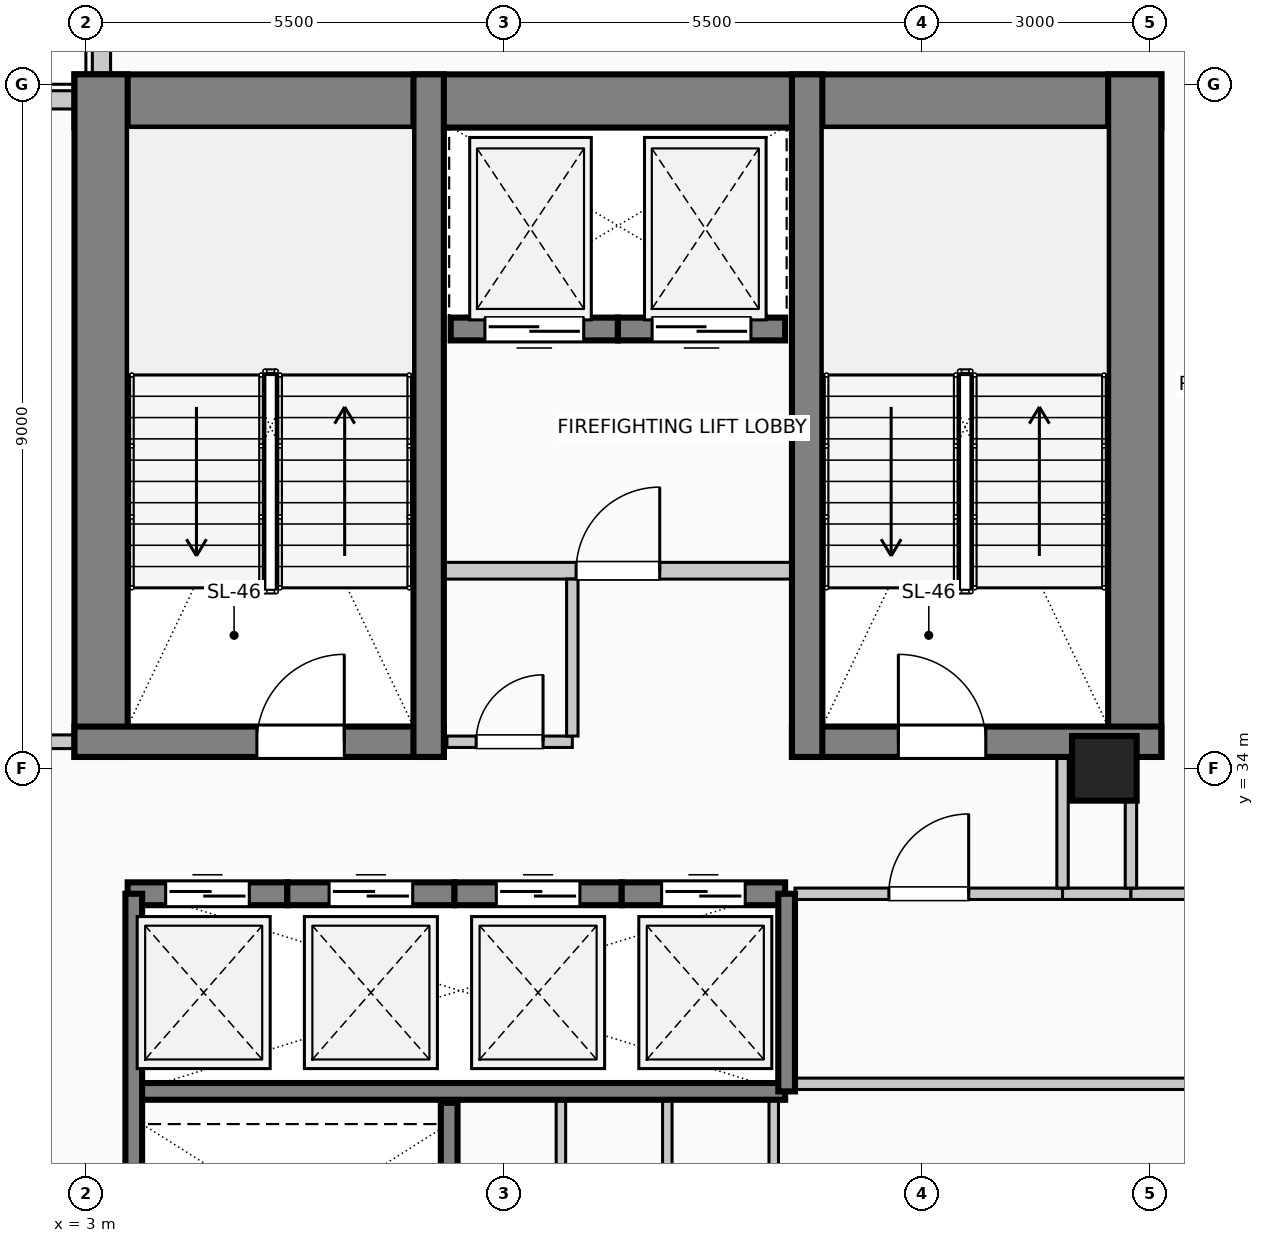
"""IFC4 building model, lengths in metres.
Left out: names, types, materials, properties, quantities, classifications, styles, units other than length and angle.
Written with IfcOpenShell. Run it as: python <this file> out.ifc"""

import sys

from ifc_helpers import new_model, si_unit, direction, frame, frame_2d, origin, origin_2d, place, context, subcontext, project, spatial, rectangle, circle, extrude, element, fill, save


model = new_model("IFC4")
c1 = context("Model", 3, precision=1e-05, world=origin(), true_north=direction((0.0, 1.0)))
c2 = subcontext(c1, "Body", "Model", "MODEL_VIEW")
j1 = project(units=[si_unit("LENGTHUNIT", "METRE"), si_unit("PLANEANGLEUNIT", "RADIAN")], contexts=[c1])
p1 = place(None, origin())
s1 = spatial("IfcSite", under=j1, at=p1, CompositionType="ELEMENT")
p2 = place(p1, origin())
s2 = spatial("IfcBuilding", under=s1, at=p2, CompositionType="ELEMENT")
p3 = place(p2, frame((0.0, 0.0, 252.6)))
s3 = spatial("IfcBuildingStorey", under=s2, at=p3, CompositionType="ELEMENT", Elevation=252.6)
p4 = place(p3, frame((2.85, 42.78, 0.0), z_axis=(0.0, 0.0, 1.0), x_axis=(1.0, 0.0, 0.0)))
e1 = element("IfcWall", 1, at=p4, inside=s3, PredefinedType="SHEAR", context=c2, shape_type="SweptSolid", body=[
    extrude(rectangle(XDim=14.3, YDim=0.7, at=frame_2d((7.15, 0.0))), origin(), (0.0, 0.0, 1.0), 4.0),
])
for number, where, z_axis, x_axis in (
    (2, (3.2, 34.15, 0.0), (0.0, 0.0, 1.0), (0.0, 1.0, 0.0)),
    (3, (16.8, 34.15, 0.0), (0.0, 0.0, 1.0), (0.0, 1.0, 0.0)),
):
    element("IfcWall", number, at=place(p3, frame(where, z_axis=z_axis, x_axis=x_axis)), inside=s3, PredefinedType="SHEAR", context=c2, shape_type="SweptSolid", body=[
        extrude(rectangle(XDim=8.98, YDim=0.7, at=frame_2d((4.49, 0.0))), origin(), (0.0, 0.0, 1.0), 4.0),
    ])
p5 = place(p3, frame((2.85, 34.35, 0.0), z_axis=(0.0, 0.0, 1.0), x_axis=(1.0, 0.0, 0.0)))
e4 = element("IfcWall", 4, at=p5, inside=s3, PredefinedType="SHEAR", context=c2, shape_type="SweptSolid", body=[
    extrude(rectangle(XDim=4.86, YDim=0.4, at=frame_2d((2.43, 0.0))), origin(), (0.0, 0.0, 1.0), 4.0),
])
p6 = place(p5, frame((2.4, 0.0, 0.0)))
e5 = element("IfcOpeningElement", 5, at=p6, cuts=e4, PredefinedType="OPENING", context=c2, shape_type="SweptSolid", body=[
    extrude(rectangle(XDim=1.15, YDim=2.2, at=frame_2d((0.575, 1.1))), frame((0.0, 0.21, 0.0), z_axis=(0.0, -1.0, 0.0), x_axis=(1.0, 0.0, 0.0)), (0.0, 0.0, 1.0), 0.42),
])
p7 = place(p3, frame((12.29, 34.35, 0.0), z_axis=(0.0, 0.0, 1.0), x_axis=(1.0, 0.0, 0.0)))
e6 = element("IfcWall", 6, at=p7, inside=s3, PredefinedType="SHEAR", context=c2, shape_type="SweptSolid", body=[
    extrude(rectangle(XDim=4.86, YDim=0.4, at=frame_2d((2.43, 0.0))), origin(), (0.0, 0.0, 1.0), 4.0),
])
p8 = place(p7, frame((1.4, 0.0, 0.0)))
e7 = element("IfcOpeningElement", 7, at=p8, cuts=e6, PredefinedType="OPENING", context=c2, shape_type="SweptSolid", body=[
    extrude(rectangle(XDim=1.15, YDim=2.2, at=frame_2d((0.575, 1.1))), frame((0.0, 0.21, 0.0), z_axis=(0.0, -1.0, 0.0), x_axis=(1.0, 0.0, 0.0)), (0.0, 0.0, 1.0), 0.42),
])
for number, where, z_axis, x_axis in (
    (8, (7.51, 34.15, 0.0), (0.0, 0.0, 1.0), (0.0, 1.0, 0.0)),
    (9, (12.49, 34.15, 0.0), (0.0, 0.0, 1.0), (0.0, 1.0, 0.0)),
):
    element("IfcWall", number, at=place(p3, frame(where, z_axis=z_axis, x_axis=x_axis)), inside=s3, PredefinedType="SHEAR", context=c2, shape_type="SweptSolid", body=[
        extrude(rectangle(XDim=8.98, YDim=0.4, at=frame_2d((4.49, 0.0))), origin(), (0.0, 0.0, 1.0), 4.0),
    ])
p9 = place(p3, frame((16.4, 34.0, 0.0), z_axis=(0.0, 0.0, 1.0), x_axis=(1.0, 0.0, 0.0)))
e10 = element("IfcColumn", 10, at=p9, inside=s3, PredefinedType="COLUMN", context=c2, shape_type="SweptSolid", body=[
    extrude(circle(Radius=0.425, at=origin_2d()), origin(), (0.0, 0.0, 1.0), 4.0),
])
p10 = place(p3, frame((0.6, 42.795, 0.0), z_axis=(0.0, 0.0, 1.0), x_axis=(1.0, 0.0, 0.0)))
e11 = element("IfcWall", 11, at=p10, inside=s3, PredefinedType="SOLIDWALL", context=c2, shape_type="SweptSolid", body=[
    extrude(rectangle(XDim=2.245, YDim=0.24, at=frame_2d((1.123, 0.0))), origin(), (0.0, 0.0, 1.0), 3.75),
])
p11 = place(p3, frame((3.205, 43.135, 0.0), z_axis=(0.0, 0.0, 1.0), x_axis=(0.0, 1.0, 0.0)))
e12 = element("IfcWall", 12, at=p11, inside=s3, PredefinedType="SOLIDWALL", context=c2, shape_type="SweptSolid", body=[
    extrude(rectangle(XDim=2.265, YDim=0.24, at=frame_2d((1.132, 0.0))), origin(), (0.0, 0.0, 1.0), 3.75),
])
p12 = place(p3, frame((3.55, 32.35, 0.0), z_axis=(0.0, 0.0, 1.0), x_axis=(1.0, 0.0, 0.0)))
e13 = element("IfcWall", 13, at=p12, inside=s3, PredefinedType="SOLIDWALL", context=c2, shape_type="SweptSolid", body=[
    extrude(rectangle(XDim=2.1, YDim=0.3, at=frame_2d((1.05, 0.0))), origin(), (0.0, 0.0, 1.0), 4.0),
])
p13 = place(p12, frame((0.5, 0.0, 0.0)))
e14 = element("IfcOpeningElement", 14, at=p13, cuts=e13, PredefinedType="OPENING", context=c2, shape_type="SweptSolid", body=[
    extrude(rectangle(XDim=1.1, YDim=2.2, at=frame_2d((0.55, 1.1))), frame((0.0, 0.16, 0.0), z_axis=(0.0, -1.0, 0.0), x_axis=(1.0, 0.0, 0.0)), (0.0, 0.0, 1.0), 0.32),
])
p14 = place(p3, frame((5.65, 32.35, 0.0), z_axis=(0.0, 0.0, 1.0), x_axis=(1.0, 0.0, 0.0)))
e15 = element("IfcWall", 15, at=p14, inside=s3, PredefinedType="SOLIDWALL", context=c2, shape_type="SweptSolid", body=[
    extrude(rectangle(XDim=2.2, YDim=0.3, at=frame_2d((1.1, 0.0))), origin(), (0.0, 0.0, 1.0), 4.0),
])
p15 = place(p14, frame((0.55, 0.0, 0.0)))
e16 = element("IfcOpeningElement", 16, at=p15, cuts=e15, PredefinedType="OPENING", context=c2, shape_type="SweptSolid", body=[
    extrude(rectangle(XDim=1.1, YDim=2.2, at=frame_2d((0.55, 1.1))), frame((0.0, 0.16, 0.0), z_axis=(0.0, -1.0, 0.0), x_axis=(1.0, 0.0, 0.0)), (0.0, 0.0, 1.0), 0.32),
])
p16 = place(p3, frame((7.85, 32.35, 0.0), z_axis=(0.0, 0.0, 1.0), x_axis=(1.0, 0.0, 0.0)))
e17 = element("IfcWall", 17, at=p16, inside=s3, PredefinedType="SOLIDWALL", context=c2, shape_type="SweptSolid", body=[
    extrude(rectangle(XDim=2.2, YDim=0.3, at=frame_2d((1.1, 0.0))), origin(), (0.0, 0.0, 1.0), 4.0),
])
p17 = place(p16, frame((0.55, 0.0, 0.0)))
e18 = element("IfcOpeningElement", 18, at=p17, cuts=e17, PredefinedType="OPENING", context=c2, shape_type="SweptSolid", body=[
    extrude(rectangle(XDim=1.1, YDim=2.2, at=frame_2d((0.55, 1.1))), frame((0.0, 0.16, 0.0), z_axis=(0.0, -1.0, 0.0), x_axis=(1.0, 0.0, 0.0)), (0.0, 0.0, 1.0), 0.32),
])
p18 = place(p3, frame((10.05, 32.35, 0.0), z_axis=(0.0, 0.0, 1.0), x_axis=(1.0, 0.0, 0.0)))
e19 = element("IfcWall", 19, at=p18, inside=s3, PredefinedType="SOLIDWALL", context=c2, shape_type="SweptSolid", body=[
    extrude(rectangle(XDim=2.15, YDim=0.3, at=frame_2d((1.075, 0.0))), origin(), (0.0, 0.0, 1.0), 4.0),
])
p19 = place(p18, frame((0.525, 0.0, 0.0)))
e20 = element("IfcOpeningElement", 20, at=p19, cuts=e19, PredefinedType="OPENING", context=c2, shape_type="SweptSolid", body=[
    extrude(rectangle(XDim=1.1, YDim=2.2, at=frame_2d((0.55, 1.1))), frame((0.0, 0.16, 0.0), z_axis=(0.0, -1.0, 0.0), x_axis=(1.0, 0.0, 0.0)), (0.0, 0.0, 1.0), 0.32),
])
p20 = place(p3, frame((10.0, 39.78, 0.0), z_axis=(0.0, 0.0, 1.0), x_axis=(-1.0, 0.0, 0.0)))
e21 = element("IfcWall", 21, at=p20, inside=s3, PredefinedType="SOLIDWALL", context=c2, shape_type="SweptSolid", body=[
    extrude(rectangle(XDim=2.2, YDim=0.3, at=frame_2d((1.1, 0.0))), origin(), (0.0, 0.0, 1.0), 4.0),
])
p21 = place(p20, frame((0.45, 0.0, 0.0)))
e22 = element("IfcOpeningElement", 22, at=p21, cuts=e21, PredefinedType="OPENING", context=c2, shape_type="SweptSolid", body=[
    extrude(rectangle(XDim=1.3, YDim=2.25, at=frame_2d((0.65, 1.125))), frame((0.0, 0.16, 0.0), z_axis=(0.0, -1.0, 0.0), x_axis=(1.0, 0.0, 0.0)), (0.0, 0.0, 1.0), 0.32),
])
p22 = place(p3, frame((12.2, 39.78, 0.0), z_axis=(0.0, 0.0, 1.0), x_axis=(-1.0, 0.0, 0.0)))
e23 = element("IfcWall", 23, at=p22, inside=s3, PredefinedType="SOLIDWALL", context=c2, shape_type="SweptSolid", body=[
    extrude(rectangle(XDim=2.2, YDim=0.3, at=frame_2d((1.1, 0.0))), origin(), (0.0, 0.0, 1.0), 4.0),
])
p23 = place(p22, frame((0.45, 0.0, 0.0)))
e24 = element("IfcOpeningElement", 24, at=p23, cuts=e23, PredefinedType="OPENING", context=c2, shape_type="SweptSolid", body=[
    extrude(rectangle(XDim=1.3, YDim=2.25, at=frame_2d((0.65, 1.125))), frame((0.0, 0.16, 0.0), z_axis=(0.0, -1.0, 0.0), x_axis=(1.0, 0.0, 0.0)), (0.0, 0.0, 1.0), 0.32),
])
p24 = place(p3, frame((3.55, 29.75, 0.0), z_axis=(0.0, 0.0, 1.0), x_axis=(1.0, 0.0, 0.0)))
e25 = element("IfcWall", 25, at=p24, inside=s3, PredefinedType="SOLIDWALL", context=c2, shape_type="SweptSolid", body=[
    extrude(rectangle(XDim=8.65, YDim=0.22, at=frame_2d((4.325, 0.0))), origin(), (0.0, 0.0, 1.0), 4.0),
])
p25 = place(p3, frame((3.63, 26.8, 0.0), z_axis=(0.0, 0.0, 1.0), x_axis=(0.0, 1.0, 0.0)))
e26 = element("IfcWall", 26, at=p25, inside=s3, PredefinedType="SOLIDWALL", context=c2, shape_type="SweptSolid", body=[
    extrude(rectangle(XDim=5.55, YDim=0.22, at=frame_2d((2.775, 0.0))), origin(), (0.0, 0.0, 1.0), 4.0),
])
p26 = place(p3, frame((7.78, 26.8, 0.0), z_axis=(0.0, 0.0, 1.0), x_axis=(0.0, 1.0, 0.0)))
e27 = element("IfcWall", 27, at=p26, inside=s3, PredefinedType="SOLIDWALL", context=c2, shape_type="SweptSolid", body=[
    extrude(rectangle(XDim=2.8, YDim=0.22, at=frame_2d((1.4, 0.0))), origin(), (0.0, 0.0, 1.0), 4.0),
])
p27 = place(p3, frame((12.22, 29.75, 0.0), z_axis=(0.0, 0.0, 1.0), x_axis=(0.0, 1.0, 0.0)))
e28 = element("IfcWall", 28, at=p27, inside=s3, PredefinedType="SOLIDWALL", context=c2, shape_type="SweptSolid", body=[
    extrude(rectangle(XDim=2.6, YDim=0.22, at=frame_2d((1.3, 0.0))), origin(), (0.0, 0.0, 1.0), 4.0),
])
p28 = place(p3, frame((7.51, 36.6, 0.0), z_axis=(0.0, 0.0, 1.0), x_axis=(1.0, 0.0, 0.0)))
e29 = element("IfcWall", 29, at=p28, inside=s3, PredefinedType="PARTITIONING", context=c2, shape_type="SweptSolid", body=[
    extrude(rectangle(XDim=4.98, YDim=0.22, at=frame_2d((2.49, 0.0))), origin(), (0.0, 0.0, 1.0), 3.75),
])
p29 = place(p28, frame((1.94, 0.0, 0.0)))
e30 = element("IfcOpeningElement", 30, at=p29, cuts=e29, PredefinedType="OPENING", context=c2, shape_type="SweptSolid", body=[
    extrude(rectangle(XDim=1.1, YDim=2.2, at=frame_2d((0.55, 1.1))), frame((0.0, 0.12, 0.0), z_axis=(0.0, -1.0, 0.0), x_axis=(1.0, 0.0, 0.0)), (0.0, 0.0, 1.0), 0.24),
])
p30 = place(p3, frame((12.33, 29.85, 0.0), z_axis=(0.0, 0.0, 1.0), x_axis=(1.0, 0.0, 0.0)))
e31 = element("IfcWall", 31, at=p30, inside=s3, PredefinedType="PARTITIONING", context=c2, shape_type="SweptSolid", body=[
    extrude(rectangle(XDim=8.67, YDim=0.15, at=frame_2d((4.335, 0.0))), origin(), (0.0, 0.0, 1.0), 3.75),
])
p31 = place(p3, frame((12.33, 32.35, 0.0), z_axis=(0.0, 0.0, 1.0), x_axis=(1.0, 0.0, 0.0)))
e32 = element("IfcWall", 32, at=p31, inside=s3, PredefinedType="PARTITIONING", context=c2, shape_type="SweptSolid", body=[
    extrude(rectangle(XDim=3.52, YDim=0.15, at=frame_2d((1.76, 0.0))), origin(), (0.0, 0.0, 1.0), 3.75),
])
p32 = place(p31, frame((1.235, 0.0, 0.0)))
e33 = element("IfcOpeningElement", 33, at=p32, cuts=e32, PredefinedType="OPENING", context=c2, shape_type="SweptSolid", body=[
    extrude(rectangle(XDim=1.05, YDim=2.15, at=frame_2d((0.525, 1.075))), frame((0.0, 0.085, 0.0), z_axis=(0.0, -1.0, 0.0), x_axis=(1.0, 0.0, 0.0)), (0.0, 0.0, 1.0), 0.17),
])
p33 = place(p3, frame((15.85, 32.35, 0.0), z_axis=(0.0, 0.0, 1.0), x_axis=(1.0, 0.0, 0.0)))
e34 = element("IfcWall", 34, at=p33, inside=s3, PredefinedType="PARTITIONING", context=c2, shape_type="SweptSolid", body=[
    extrude(rectangle(XDim=0.9, YDim=0.15, at=frame_2d((0.45, 0.0))), origin(), (0.0, 0.0, 1.0), 3.75),
])
p34 = place(p3, frame((16.75, 32.35, 0.0), z_axis=(0.0, 0.0, 1.0), x_axis=(1.0, 0.0, 0.0)))
e35 = element("IfcWall", 35, at=p34, inside=s3, PredefinedType="PARTITIONING", context=c2, shape_type="SweptSolid", body=[
    extrude(rectangle(XDim=4.25, YDim=0.15, at=frame_2d((2.125, 0.0))), origin(), (0.0, 0.0, 1.0), 3.75),
])
p35 = place(p3, frame((1.1, 34.35, 0.0), z_axis=(0.0, 0.0, 1.0), x_axis=(1.0, 0.0, 0.0)))
e36 = element("IfcWall", 36, at=p35, inside=s3, PredefinedType="PARTITIONING", context=c2, shape_type="SweptSolid", body=[
    extrude(rectangle(XDim=1.75, YDim=0.18, at=frame_2d((0.875, 0.0))), origin(), (0.0, 0.0, 1.0), 3.75),
])
p36 = place(p3, frame((7.75, 34.35, 0.0), z_axis=(0.0, 0.0, 1.0), x_axis=(1.0, 0.0, 0.0)))
e37 = element("IfcWall", 37, at=p36, inside=s3, PredefinedType="PARTITIONING", context=c2, shape_type="SweptSolid", body=[
    extrude(rectangle(XDim=1.65, YDim=0.15, at=frame_2d((0.825, 0.0))), origin(), (0.0, 0.0, 1.0), 3.75),
])
p37 = place(p36, frame((0.385, 0.0, 0.0)))
e38 = element("IfcOpeningElement", 38, at=p37, cuts=e37, PredefinedType="OPENING", context=c2, shape_type="SweptSolid", body=[
    extrude(rectangle(XDim=0.88, YDim=2.1, at=frame_2d((0.44, 1.05))), frame((0.0, 0.085, 0.0), z_axis=(0.0, -1.0, 0.0), x_axis=(1.0, 0.0, 0.0)), (0.0, 0.0, 1.0), 0.17),
])
p38 = place(p3, frame((9.25, 26.863, 0.0), z_axis=(0.0, 0.0, 1.0), x_axis=(0.0, 1.0, 0.0)))
e39 = element("IfcWall", 39, at=p38, inside=s3, PredefinedType="PARTITIONING", context=c2, shape_type="SweptSolid", body=[
    extrude(rectangle(XDim=2.777, YDim=0.125, at=frame_2d((1.389, 0.0))), origin(), (0.0, 0.0, 1.0), 3.75),
])
p39 = place(p3, frame((9.4, 34.425, 0.0), z_axis=(0.0, 0.0, 1.0), x_axis=(0.0, 1.0, 0.0)))
e40 = element("IfcWall", 40, at=p39, inside=s3, PredefinedType="PARTITIONING", context=c2, shape_type="SweptSolid", body=[
    extrude(rectangle(XDim=2.065, YDim=0.15, at=frame_2d((1.032, 0.0))), origin(), (0.0, 0.0, 1.0), 3.75),
])
for number, where, z_axis, x_axis in (
    (41, (10.65, 26.863, 0.0), (0.0, 0.0, 1.0), (0.0, 1.0, 0.0)),
    (42, (12.05, 26.863, 0.0), (0.0, 0.0, 1.0), (0.0, 1.0, 0.0)),
):
    element("IfcWall", number, at=place(p3, frame(where, z_axis=z_axis, x_axis=x_axis)), inside=s3, PredefinedType="PARTITIONING", context=c2, shape_type="SweptSolid", body=[
        extrude(rectangle(XDim=2.777, YDim=0.125, at=frame_2d((1.389, 0.0))), origin(), (0.0, 0.0, 1.0), 3.75),
    ])
p40 = place(p3, frame((15.85, 32.425, 0.0), z_axis=(0.0, 0.0, 1.0), x_axis=(0.0, 1.0, 0.0)))
e43 = element("IfcWall", 43, at=p40, inside=s3, PredefinedType="PARTITIONING", context=c2, shape_type="SweptSolid", body=[
    extrude(rectangle(XDim=1.725, YDim=0.15, at=frame_2d((0.862, 0.0))), origin(), (0.0, 0.0, 1.0), 3.75),
])
p41 = place(p3, frame((16.75, 32.425, 0.0), z_axis=(0.0, 0.0, 1.0), x_axis=(0.0, 1.0, 0.0)))
e44 = element("IfcWall", 44, at=p41, inside=s3, PredefinedType="PARTITIONING", context=c2, shape_type="SweptSolid", body=[
    extrude(rectangle(XDim=1.15, YDim=0.15, at=frame_2d((0.575, 0.0))), origin(), (0.0, 0.0, 1.0), 3.75),
])
p42 = place(p13, origin())
e45 = element("IfcDoor", 45, at=p42, inside=s3, OperationType="SLIDING_TO_LEFT", PredefinedType="DOOR", context=c2, shape_type="SweptSolid", body=[
    extrude(rectangle(XDim=1.1, YDim=2.2, at=frame_2d((0.55, 1.1))), frame((0.0, 0.025, 0.0), z_axis=(0.0, -1.0, 0.0), x_axis=(1.0, 0.0, 0.0)), (0.0, 0.0, 1.0), 0.05),
])
fill(e14, e45)
p43 = place(p15, origin())
e46 = element("IfcDoor", 46, at=p43, inside=s3, OperationType="SLIDING_TO_RIGHT", PredefinedType="DOOR", context=c2, shape_type="SweptSolid", body=[
    extrude(rectangle(XDim=1.1, YDim=2.2, at=frame_2d((0.55, 1.1))), frame((0.0, 0.025, 0.0), z_axis=(0.0, -1.0, 0.0), x_axis=(1.0, 0.0, 0.0)), (0.0, 0.0, 1.0), 0.05),
])
fill(e16, e46)
p44 = place(p17, origin())
e47 = element("IfcDoor", 47, at=p44, inside=s3, OperationType="SLIDING_TO_LEFT", PredefinedType="DOOR", context=c2, shape_type="SweptSolid", body=[
    extrude(rectangle(XDim=1.1, YDim=2.2, at=frame_2d((0.55, 1.1))), frame((0.0, 0.025, 0.0), z_axis=(0.0, -1.0, 0.0), x_axis=(1.0, 0.0, 0.0)), (0.0, 0.0, 1.0), 0.05),
])
fill(e18, e47)
p45 = place(p19, origin())
e48 = element("IfcDoor", 48, at=p45, inside=s3, OperationType="SLIDING_TO_RIGHT", PredefinedType="DOOR", context=c2, shape_type="SweptSolid", body=[
    extrude(rectangle(XDim=1.1, YDim=2.2, at=frame_2d((0.55, 1.1))), frame((0.0, 0.025, 0.0), z_axis=(0.0, -1.0, 0.0), x_axis=(1.0, 0.0, 0.0)), (0.0, 0.0, 1.0), 0.05),
])
fill(e20, e48)
p46 = place(p21, origin())
e49 = element("IfcDoor", 49, at=p46, inside=s3, OperationType="SLIDING_TO_LEFT", PredefinedType="DOOR", context=c2, shape_type="SweptSolid", body=[
    extrude(rectangle(XDim=1.3, YDim=2.25, at=frame_2d((0.65, 1.125))), frame((0.0, 0.025, 0.0), z_axis=(0.0, -1.0, 0.0), x_axis=(1.0, 0.0, 0.0)), (0.0, 0.0, 1.0), 0.05),
])
fill(e22, e49)
p47 = place(p23, origin())
e50 = element("IfcDoor", 50, at=p47, inside=s3, OperationType="SLIDING_TO_RIGHT", PredefinedType="DOOR", context=c2, shape_type="SweptSolid", body=[
    extrude(rectangle(XDim=1.3, YDim=2.25, at=frame_2d((0.65, 1.125))), frame((0.0, 0.025, 0.0), z_axis=(0.0, -1.0, 0.0), x_axis=(1.0, 0.0, 0.0)), (0.0, 0.0, 1.0), 0.05),
])
fill(e24, e50)
p48 = place(p6, origin())
e51 = element("IfcDoor", 51, at=p48, inside=s3, OperationType="SINGLE_SWING_RIGHT", PredefinedType="DOOR", context=c2, shape_type="SweptSolid", body=[
    extrude(rectangle(XDim=1.15, YDim=2.2, at=frame_2d((0.575, 1.1))), frame((0.0, 0.025, 0.0), z_axis=(0.0, -1.0, 0.0), x_axis=(1.0, 0.0, 0.0)), (0.0, 0.0, 1.0), 0.05),
])
fill(e5, e51)
p49 = place(p8, origin())
e52 = element("IfcDoor", 52, at=p49, inside=s3, OperationType="SINGLE_SWING_LEFT", PredefinedType="DOOR", context=c2, shape_type="SweptSolid", body=[
    extrude(rectangle(XDim=1.15, YDim=2.2, at=frame_2d((0.575, 1.1))), frame((0.0, 0.025, 0.0), z_axis=(0.0, -1.0, 0.0), x_axis=(1.0, 0.0, 0.0)), (0.0, 0.0, 1.0), 0.05),
])
fill(e7, e52)
p50 = place(p29, origin())
e53 = element("IfcDoor", 53, at=p50, inside=s3, OperationType="SINGLE_SWING_RIGHT", PredefinedType="DOOR", context=c2, shape_type="SweptSolid", body=[
    extrude(rectangle(XDim=1.1, YDim=2.2, at=frame_2d((0.55, 1.1))), frame((0.0, 0.025, 0.0), z_axis=(0.0, -1.0, 0.0), x_axis=(1.0, 0.0, 0.0)), (0.0, 0.0, 1.0), 0.05),
])
fill(e30, e53)
p51 = place(p32, origin())
e54 = element("IfcDoor", 54, at=p51, inside=s3, OperationType="SINGLE_SWING_RIGHT", PredefinedType="DOOR", context=c2, shape_type="SweptSolid", body=[
    extrude(rectangle(XDim=1.05, YDim=2.15, at=frame_2d((0.525, 1.075))), frame((0.0, 0.025, 0.0), z_axis=(0.0, -1.0, 0.0), x_axis=(1.0, 0.0, 0.0)), (0.0, 0.0, 1.0), 0.05),
])
fill(e33, e54)
p52 = place(p37, origin())
e55 = element("IfcDoor", 55, at=p52, inside=s3, OperationType="SINGLE_SWING_RIGHT", PredefinedType="DOOR", context=c2, shape_type="SweptSolid", body=[
    extrude(rectangle(XDim=0.88, YDim=2.1, at=frame_2d((0.44, 1.05))), frame((0.0, 0.025, 0.0), z_axis=(0.0, -1.0, 0.0), x_axis=(1.0, 0.0, 0.0)), (0.0, 0.0, 1.0), 0.05),
])
fill(e38, e55)
save(model, sys.argv[1])
